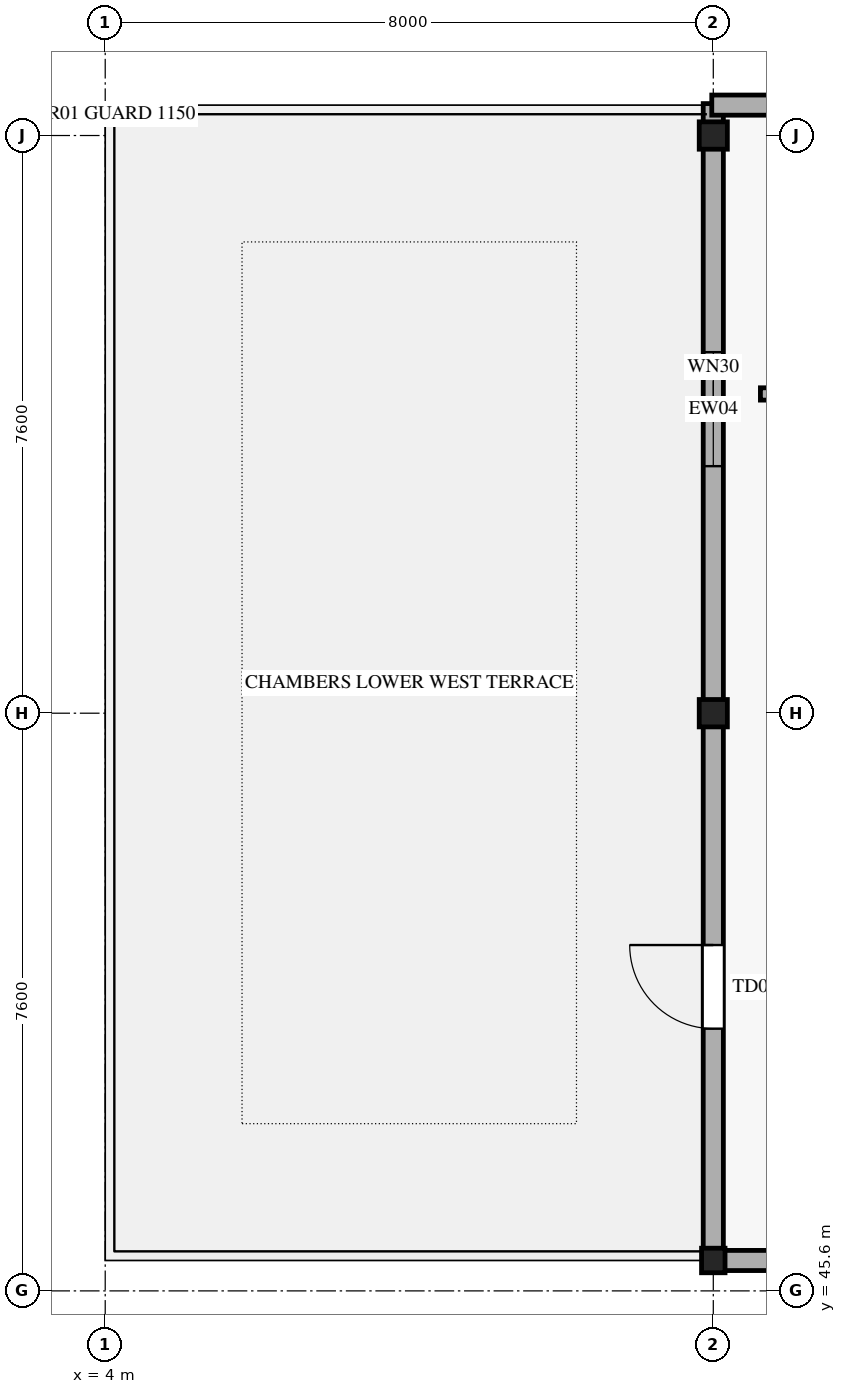
"""IFC4 building model, lengths in metres.
Left out: names, types, materials, properties, quantities, classifications, styles, units other than length and angle.
Written with IfcOpenShell. Run it as: python <this file> out.ifc"""

import sys

from ifc_helpers import new_model, si_unit, direction, frame, frame_2d, origin, origin_2d, place, context, subcontext, project, spatial, rectangle, i_section, extrude, element, fill, save


model = new_model("IFC4")
c1 = context("Model", 3, precision=1e-05, world=origin(), true_north=direction((0.0, 1.0)))
c2 = subcontext(c1, "Body", "Model", "MODEL_VIEW")
j1 = project(units=[si_unit("LENGTHUNIT", "METRE"), si_unit("PLANEANGLEUNIT", "RADIAN")], contexts=[c1])
p1 = place(None, origin())
s1 = spatial("IfcSite", under=j1, at=p1, CompositionType="ELEMENT")
p2 = place(p1, origin())
s2 = spatial("IfcBuilding", under=s1, at=p2, CompositionType="ELEMENT")
p3 = place(p2, frame((0.0, 0.0, 25.2)))
s3 = spatial("IfcBuildingStorey", under=s2, at=p3, CompositionType="ELEMENT", Elevation=25.2)
p4 = place(p3, frame((12.0, 46.0, 0.0), z_axis=(0.0, 0.0, 1.0), x_axis=(1.0, 0.0, 0.0)))
e1 = element("IfcColumn", 1, at=p4, inside=s3, PredefinedType="COLUMN", context=c2, shape_type="SweptSolid", body=[
    extrude(i_section(OverallWidth=0.309, OverallDepth=0.323, WebThickness=0.014, FlangeThickness=0.023, FilletRadius=0.015, at=origin_2d()), origin(), (0.0, 0.0, 1.0), 3.995),
])
for number, where, z_axis, x_axis in (
    (2, (12.0, 53.2, 0.0), (0.0, 0.0, 1.0), (1.0, 0.0, 0.0)),
    (3, (12.0, 60.8, 0.0), (0.0, 0.0, 1.0), (1.0, 0.0, 0.0)),
):
    element("IfcColumn", number, at=place(p3, frame(where, z_axis=z_axis, x_axis=x_axis)), inside=s3, PredefinedType="COLUMN", context=c2, shape_type="SweptSolid", body=[
        extrude(i_section(OverallWidth=0.37, OverallDepth=0.36, WebThickness=0.012, FlangeThickness=0.02, FilletRadius=0.015, at=origin_2d()), origin(), (0.0, 0.0, 1.0), 3.995),
    ])
p5 = place(p3, frame((12.0, 45.98, 0.0), z_axis=(0.0, 0.0, 1.0), x_axis=(0.0, 1.0, 0.0)))
e4 = element("IfcWall", 4, at=p5, inside=s3, PredefinedType="STANDARD", context=c2, shape_type="SweptSolid", body=[
    extrude(rectangle(XDim=7.24, YDim=0.265, at=frame_2d((3.62, 0.0))), origin(), (0.0, 0.0, 1.0), 3.06),
])
p6 = place(p5, frame((3.07, 0.0, 0.0)))
e5 = element("IfcOpeningElement", 5, at=p6, cuts=e4, PredefinedType="OPENING", context=c2, shape_type="SweptSolid", body=[
    extrude(rectangle(XDim=1.1, YDim=2.2, at=frame_2d((0.55, 1.1))), frame((0.0, 0.142, 0.0), z_axis=(0.0, -1.0, 0.0), x_axis=(1.0, 0.0, 0.0)), (0.0, 0.0, 1.0), 0.285),
])
p7 = place(p3, frame((12.0, 53.18, 0.0), z_axis=(0.0, 0.0, 1.0), x_axis=(0.0, 1.0, 0.0)))
e6 = element("IfcWall", 6, at=p7, inside=s3, PredefinedType="STANDARD", context=c2, shape_type="SweptSolid", body=[
    extrude(rectangle(XDim=8.04, YDim=0.265, at=frame_2d((4.02, 0.0))), origin(), (0.0, 0.0, 1.0), 3.06),
])
p8 = place(p7, frame((3.27, 0.0, 0.75)))
e7 = element("IfcOpeningElement", 7, at=p8, cuts=e6, PredefinedType="OPENING", context=c2, shape_type="SweptSolid", body=[
    extrude(rectangle(XDim=1.5, YDim=1.3, at=frame_2d((0.75, 0.65))), frame((0.0, 0.142, 0.0), z_axis=(0.0, -1.0, 0.0), x_axis=(1.0, 0.0, 0.0)), (0.0, 0.0, 1.0), 0.285),
])
p9 = place(p3, frame((11.98, 61.2, 0.0), z_axis=(0.0, 0.0, 1.0), x_axis=(1.0, 0.0, 0.0)))
e8 = element("IfcWall", 8, at=p9, inside=s3, PredefinedType="STANDARD", context=c2, shape_type="SweptSolid", body=[
    extrude(rectangle(XDim=8.04, YDim=0.265, at=frame_2d((4.02, 0.0))), origin(), (0.0, 0.0, 1.0), 3.06),
])
p10 = place(p9, frame((3.07, 0.0, 0.75)))
e9 = element("IfcOpeningElement", 9, at=p10, cuts=e8, PredefinedType="OPENING", context=c2, shape_type="SweptSolid", body=[
    extrude(rectangle(XDim=1.9, YDim=1.3, at=frame_2d((0.95, 0.65))), frame((0.0, 0.142, 0.0), z_axis=(0.0, -1.0, 0.0), x_axis=(1.0, 0.0, 0.0)), (0.0, 0.0, 1.0), 0.285),
])
p11 = place(p3, frame((20.02, 46.0, 0.0), z_axis=(0.0, 0.0, 1.0), x_axis=(-1.0, 0.0, 0.0)))
e10 = element("IfcWall", 10, at=p11, inside=s3, PredefinedType="STANDARD", context=c2, shape_type="SweptSolid", body=[
    extrude(rectangle(XDim=8.04, YDim=0.265, at=frame_2d((4.02, 0.0))), origin(), (0.0, 0.0, 1.0), 3.06),
])
p12 = place(p11, frame((3.12, 0.0, 0.75)))
e11 = element("IfcOpeningElement", 11, at=p12, cuts=e10, PredefinedType="OPENING", context=c2, shape_type="SweptSolid", body=[
    extrude(rectangle(XDim=1.8, YDim=2.0, at=frame_2d((0.9, 1.0))), frame((0.0, 0.142, 0.0), z_axis=(0.0, -1.0, 0.0), x_axis=(1.0, 0.0, 0.0)), (0.0, 0.0, 1.0), 0.285),
])
p13 = place(p3, frame((12.62, 57.4, 0.0), z_axis=(0.0, 0.0, 1.0), x_axis=(1.0, 0.0, 0.0)))
e12 = element("IfcWall", 12, at=p13, inside=s3, PredefinedType="PARTITIONING", context=c2, shape_type="SweptSolid", body=[
    extrude(rectangle(XDim=43.16, YDim=0.162, at=frame_2d((21.58, 0.0))), origin(), (0.0, 0.0, 1.0), 2.85),
])
p14 = place(p13, frame((20.99, 0.0, 0.0)))
e13 = element("IfcOpeningElement", 13, at=p14, cuts=e12, PredefinedType="OPENING", context=c2, shape_type="SweptSolid", body=[
    extrude(rectangle(XDim=1.18, YDim=2.3, at=frame_2d((0.59, 1.15))), frame((0.0, 0.091, 0.0), z_axis=(0.0, -1.0, 0.0), x_axis=(1.0, 0.0, 0.0)), (0.0, 0.0, 1.0), 0.182),
])
p15 = place(p6, origin())
e14 = element("IfcDoor", 14, at=p15, inside=s3, OperationType="SINGLE_SWING_RIGHT", PredefinedType="DOOR", context=c2, shape_type="SweptSolid", body=[
    extrude(rectangle(XDim=1.1, YDim=2.2, at=frame_2d((0.55, 1.1))), frame((0.0, 0.025, 0.0), z_axis=(0.0, -1.0, 0.0), x_axis=(1.0, 0.0, 0.0)), (0.0, 0.0, 1.0), 0.05),
])
fill(e5, e14)
p16 = place(p8, origin())
e15 = element("IfcWindow", 15, at=p16, inside=s3, PartitioningType="SINGLE_PANEL", PredefinedType="WINDOW", context=c2, shape_type="SweptSolid", body=[
    extrude(rectangle(XDim=1.5, YDim=1.3, at=frame_2d((0.75, 0.65))), frame((0.0, 0.03, 0.0), z_axis=(0.0, -1.0, 0.0), x_axis=(1.0, 0.0, 0.0)), (0.0, 0.0, 1.0), 0.06),
])
fill(e7, e15)
save(model, sys.argv[1])
